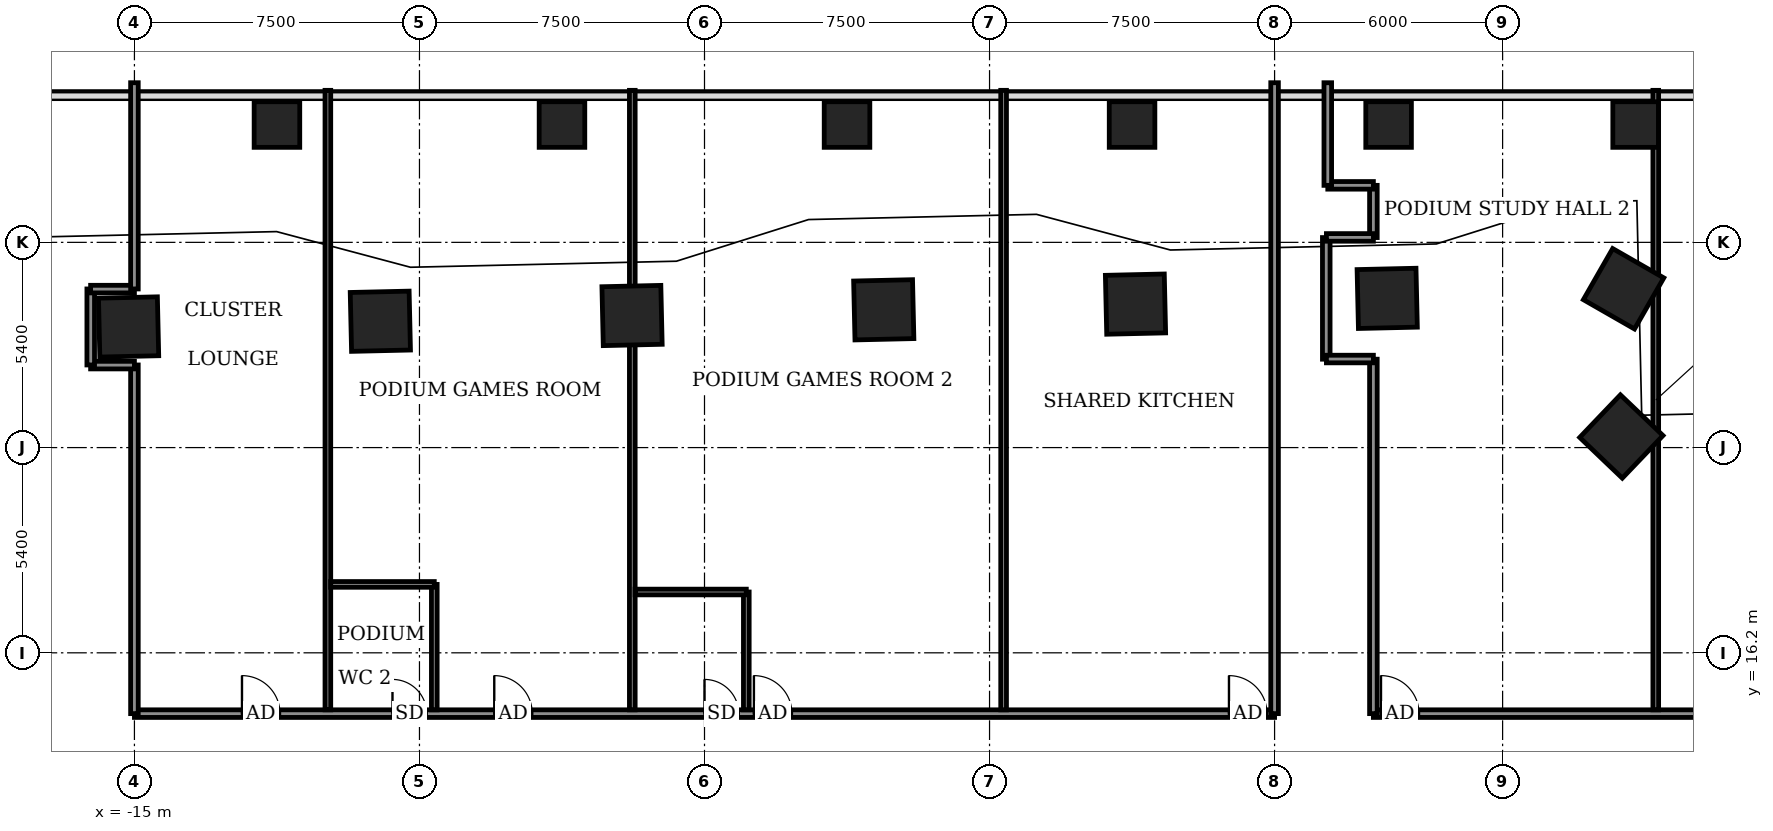
"""IFC4 building model, lengths in metres.
Left out: names, types, materials, properties, quantities, classifications, styles, units other than length and angle.
Written with IfcOpenShell. Run it as: python <this file> out.ifc"""

import sys

from ifc_helpers import new_model, si_unit, direction, frame, frame_2d, origin, origin_2d, place, context, subcontext, project, spatial, rectangle, extrude, element, fill, save


model = new_model("IFC4")
c1 = context("Model", 3, precision=1e-05, world=origin(), true_north=direction((0.0, 1.0)))
c2 = subcontext(c1, "Body", "Model", "MODEL_VIEW")
j1 = project(units=[si_unit("LENGTHUNIT", "METRE"), si_unit("PLANEANGLEUNIT", "RADIAN")], contexts=[c1])
p1 = place(None, origin())
s1 = spatial("IfcSite", under=j1, at=p1, CompositionType="ELEMENT")
p2 = place(p1, origin())
s2 = spatial("IfcBuilding", under=s1, at=p2, CompositionType="ELEMENT")
p3 = place(p2, frame((0.0, 0.0, 25.0)))
s3 = spatial("IfcBuildingStorey", under=s2, at=p3, CompositionType="ELEMENT", Elevation=25.0)
for number, where, z_axis, x_axis in (
    (1, (24.125, 21.892, -0.55), (0.0, 0.0, 1.0), (-0.723, 0.691, 0.0)),
    (2, (24.184, 25.779, -0.55), (0.0, 0.0, 1.0), (-0.868, 0.497, 0.0)),
    (3, (17.964, 25.526, -0.55), (0.0, 0.0, 1.0), (-1.0, -0.023, 0.0)),
    (4, (11.341, 25.375, -0.55), (0.0, 0.0, 1.0), (-1.0, -0.023, 0.0)),
    (5, (4.717, 25.225, -0.55), (0.0, 0.0, 1.0), (-1.0, -0.023, 0.0)),
    (6, (-1.906, 25.075, -0.55), (0.0, 0.0, 1.0), (-1.0, -0.023, 0.0)),
    (7, (-8.529, 24.924, -0.55), (0.0, 0.0, 1.0), (-1.0, -0.023, 0.0)),
    (8, (-15.154, 24.774, -0.55), (0.0, 0.0, 1.0), (-1.0, -0.023, 0.0)),
):
    element("IfcColumn", number, at=place(p3, frame(where, z_axis=z_axis, x_axis=x_axis)), inside=s3, PredefinedType="COLUMN", context=c2, shape_type="SweptSolid", body=[
        extrude(rectangle(XDim=1.55, YDim=1.55, at=origin_2d()), origin(), (0.0, 0.0, 1.0), 4.5),
    ])
for number, where, z_axis, x_axis in (
    (9, (-11.25, 30.1, -0.55), (0.0, 0.0, 1.0), (1.0, 0.0, 0.0)),
    (10, (-3.75, 30.1, -0.55), (0.0, 0.0, 1.0), (1.0, 0.0, 0.0)),
    (11, (3.75, 30.1, -0.55), (0.0, 0.0, 1.0), (1.0, 0.0, 0.0)),
    (12, (11.25, 30.1, -0.55), (0.0, 0.0, 1.0), (1.0, 0.0, 0.0)),
    (13, (18.0, 30.1, -0.55), (0.0, 0.0, 1.0), (1.0, 0.0, 0.0)),
    (14, (24.5, 30.1, -0.55), (0.0, 0.0, 1.0), (1.0, 0.0, 0.0)),
):
    element("IfcColumn", number, at=place(p3, frame(where, z_axis=z_axis, x_axis=x_axis)), inside=s3, PredefinedType="COLUMN", context=c2, shape_type="SweptSolid", body=[
        extrude(rectangle(XDim=1.2, YDim=1.2, at=origin_2d()), origin(), (0.0, 0.0, 1.0), 4.5),
    ])
p4 = place(p3, frame((-15.0, 14.6, 0.0), z_axis=(0.0, 0.0, 1.0), x_axis=(1.0, 0.0, 0.0)))
e15 = element("IfcWall", 15, at=p4, inside=s3, PredefinedType="PARTITIONING", context=c2, shape_type="SweptSolid", body=[
    extrude(rectangle(XDim=30.0, YDim=0.2, at=frame_2d((15.0, 0.0))), origin(), (0.0, 0.0, 1.0), 3.95),
])
p5 = place(p4, frame((2.83, 0.0, 0.0)))
e16 = element("IfcOpeningElement", 16, at=p5, cuts=e15, PredefinedType="OPENING", context=c2, shape_type="SweptSolid", body=[
    extrude(rectangle(XDim=1.0, YDim=2.1, at=frame_2d((0.5, 1.05))), frame((0.0, 0.11, 0.0), z_axis=(0.0, -1.0, 0.0), x_axis=(1.0, 0.0, 0.0)), (0.0, 0.0, 1.0), 0.22),
])
p6 = place(p4, frame((9.468, 0.0, 0.0)))
e17 = element("IfcOpeningElement", 17, at=p6, cuts=e15, PredefinedType="OPENING", context=c2, shape_type="SweptSolid", body=[
    extrude(rectangle(XDim=1.0, YDim=2.1, at=frame_2d((0.5, 1.05))), frame((0.0, 0.11, 0.0), z_axis=(0.0, -1.0, 0.0), x_axis=(1.0, 0.0, 0.0)), (0.0, 0.0, 1.0), 0.22),
])
p7 = place(p4, frame((6.79, 0.0, 0.0)))
e18 = element("IfcOpeningElement", 18, at=p7, cuts=e15, PredefinedType="OPENING", context=c2, shape_type="SweptSolid", body=[
    extrude(rectangle(XDim=0.9, YDim=2.1, at=frame_2d((0.45, 1.05))), frame((0.0, 0.11, 0.0), z_axis=(0.0, -1.0, 0.0), x_axis=(1.0, 0.0, 0.0)), (0.0, 0.0, 1.0), 0.22),
])
p8 = place(p4, frame((16.3, 0.0, 0.0)))
e19 = element("IfcOpeningElement", 19, at=p8, cuts=e15, PredefinedType="OPENING", context=c2, shape_type="SweptSolid", body=[
    extrude(rectangle(XDim=1.0, YDim=2.1, at=frame_2d((0.5, 1.05))), frame((0.0, 0.11, 0.0), z_axis=(0.0, -1.0, 0.0), x_axis=(1.0, 0.0, 0.0)), (0.0, 0.0, 1.0), 0.22),
])
p9 = place(p4, frame((15.0, 0.0, 0.0)))
e20 = element("IfcOpeningElement", 20, at=p9, cuts=e15, PredefinedType="OPENING", context=c2, shape_type="SweptSolid", body=[
    extrude(rectangle(XDim=0.9, YDim=2.1, at=frame_2d((0.45, 1.05))), frame((0.0, 0.11, 0.0), z_axis=(0.0, -1.0, 0.0), x_axis=(1.0, 0.0, 0.0)), (0.0, 0.0, 1.0), 0.22),
])
p10 = place(p4, frame((28.8, 0.0, 0.0)))
e21 = element("IfcOpeningElement", 21, at=p10, cuts=e15, PredefinedType="OPENING", context=c2, shape_type="SweptSolid", body=[
    extrude(rectangle(XDim=1.0, YDim=2.1, at=frame_2d((0.5, 1.05))), frame((0.0, 0.11, 0.0), z_axis=(0.0, -1.0, 0.0), x_axis=(1.0, 0.0, 0.0)), (0.0, 0.0, 1.0), 0.22),
])
p11 = place(p3, frame((-15.0, 14.6, 0.0), z_axis=(0.0, 0.0, 1.0), x_axis=(0.0, 1.0, 0.0)))
e22 = element("IfcWall", 22, at=p11, inside=s3, PredefinedType="PARTITIONING", context=c2, shape_type="SweptSolid", body=[
    extrude(rectangle(XDim=9.174, YDim=0.2, at=frame_2d((4.587, 0.0))), origin(), (0.0, 0.0, 1.0), 3.95),
])
p12 = place(p3, frame((-9.91, 14.7, 0.0), z_axis=(0.0, 0.0, 1.0), x_axis=(0.0, 1.0, 0.0)))
e23 = element("IfcWall", 23, at=p12, inside=s3, PredefinedType="PARTITIONING", context=c2, shape_type="SweptSolid", body=[
    extrude(rectangle(XDim=16.3, YDim=0.15, at=frame_2d((8.15, 0.0))), origin(), (0.0, 0.0, 1.0), 0.94),
])
p13 = place(p3, frame((-7.11, 14.7, 0.0), z_axis=(0.0, 0.0, 1.0), x_axis=(0.0, 1.0, 0.0)))
e24 = element("IfcWall", 24, at=p13, inside=s3, PredefinedType="PARTITIONING", context=c2, shape_type="SweptSolid", body=[
    extrude(rectangle(XDim=3.3, YDim=0.15, at=frame_2d((1.65, 0.0))), origin(), (0.0, 0.0, 1.0), 3.95),
])
p14 = place(p3, frame((-1.9, 14.7, 0.0), z_axis=(0.0, 0.0, 1.0), x_axis=(0.0, 1.0, 0.0)))
e25 = element("IfcWall", 25, at=p14, inside=s3, PredefinedType="PARTITIONING", context=c2, shape_type="SweptSolid", body=[
    extrude(rectangle(XDim=16.3, YDim=0.15, at=frame_2d((8.15, 0.0))), origin(), (0.0, 0.0, 1.0), 0.94),
])
p15 = place(p3, frame((1.1, 14.7, 0.0), z_axis=(0.0, 0.0, 1.0), x_axis=(0.0, 1.0, 0.0)))
e26 = element("IfcWall", 26, at=p15, inside=s3, PredefinedType="PARTITIONING", context=c2, shape_type="SweptSolid", body=[
    extrude(rectangle(XDim=3.1, YDim=0.15, at=frame_2d((1.55, 0.0))), origin(), (0.0, 0.0, 1.0), 3.95),
])
p16 = place(p3, frame((7.87, 14.7, 0.0), z_axis=(0.0, 0.0, 1.0), x_axis=(0.0, 1.0, 0.0)))
e27 = element("IfcWall", 27, at=p16, inside=s3, PredefinedType="PARTITIONING", context=c2, shape_type="SweptSolid", body=[
    extrude(rectangle(XDim=16.3, YDim=0.15, at=frame_2d((8.15, 0.0))), origin(), (0.0, 0.0, 1.0), 0.94),
])
p17 = place(p3, frame((15.0, 14.6, 0.0), z_axis=(0.0, 0.0, 1.0), x_axis=(0.0, 1.0, 0.0)))
e28 = element("IfcWall", 28, at=p17, inside=s3, PredefinedType="PARTITIONING", context=c2, shape_type="SweptSolid", body=[
    extrude(rectangle(XDim=16.6, YDim=0.2, at=frame_2d((8.3, 0.0))), origin(), (0.0, 0.0, 1.0), 0.94),
])
p18 = place(p3, frame((17.6, 14.6, 0.0), z_axis=(0.0, 0.0, 1.0), x_axis=(1.0, 0.0, 0.0)))
e29 = element("IfcWall", 29, at=p18, inside=s3, PredefinedType="PARTITIONING", context=c2, shape_type="SweptSolid", body=[
    extrude(rectangle(XDim=16.7, YDim=0.2, at=frame_2d((8.35, 0.0))), origin(), (0.0, 0.0, 1.0), 3.95),
])
p19 = place(p18, frame((13.209, 0.0, 0.0)))
e30 = element("IfcOpeningElement", 30, at=p19, cuts=e29, PredefinedType="OPENING", context=c2, shape_type="SweptSolid", body=[
    extrude(rectangle(XDim=1.0, YDim=2.1, at=frame_2d((0.5, 1.05))), frame((0.0, 0.11, 0.0), z_axis=(0.0, -1.0, 0.0), x_axis=(1.0, 0.0, 0.0)), (0.0, 0.0, 1.0), 0.22),
])
p20 = place(p18, frame((0.2, 0.0, 0.0)))
e31 = element("IfcOpeningElement", 31, at=p20, cuts=e29, PredefinedType="OPENING", context=c2, shape_type="SweptSolid", body=[
    extrude(rectangle(XDim=1.0, YDim=2.1, at=frame_2d((0.5, 1.05))), frame((0.0, 0.11, 0.0), z_axis=(0.0, -1.0, 0.0), x_axis=(1.0, 0.0, 0.0)), (0.0, 0.0, 1.0), 0.22),
])
p21 = place(p3, frame((17.6, 14.6, 0.0), z_axis=(0.0, 0.0, 1.0), x_axis=(0.0, 1.0, 0.0)))
e32 = element("IfcWall", 32, at=p21, inside=s3, PredefinedType="PARTITIONING", context=c2, shape_type="SweptSolid", body=[
    extrude(rectangle(XDim=9.326, YDim=0.2, at=frame_2d((4.663, 0.0))), origin(), (0.0, 0.0, 1.0), 3.95),
])
p22 = place(p3, frame((25.03, 14.7, 0.0), z_axis=(0.0, 0.0, 1.0), x_axis=(0.0, 1.0, 0.0)))
e33 = element("IfcWall", 33, at=p22, inside=s3, PredefinedType="PARTITIONING", context=c2, shape_type="SweptSolid", body=[
    extrude(rectangle(XDim=16.3, YDim=0.15, at=frame_2d((8.15, 0.0))), origin(), (0.0, 0.0, 1.0), 0.94),
])
p23 = place(p3, frame((-1.825, 17.8, 0.0), z_axis=(0.0, 0.0, 1.0), x_axis=(1.0, 0.0, 0.0)))
e34 = element("IfcWall", 34, at=p23, inside=s3, PredefinedType="PARTITIONING", context=c2, shape_type="SweptSolid", body=[
    extrude(rectangle(XDim=2.925, YDim=0.15, at=frame_2d((1.462, 0.0))), origin(), (0.0, 0.0, 1.0), 3.95),
])
p24 = place(p3, frame((-9.835, 18.0, 0.0), z_axis=(0.0, 0.0, 1.0), x_axis=(1.0, 0.0, 0.0)))
e35 = element("IfcWall", 35, at=p24, inside=s3, PredefinedType="PARTITIONING", context=c2, shape_type="SweptSolid", body=[
    extrude(rectangle(XDim=2.725, YDim=0.15, at=frame_2d((1.362, 0.0))), origin(), (0.0, 0.0, 1.0), 3.95),
])
p25 = place(p3, frame((-16.153, 23.77, 0.0), z_axis=(0.0, 0.0, 1.0), x_axis=(1.0, 0.0, 0.0)))
e36 = element("IfcWall", 36, at=p25, inside=s3, PredefinedType="PARTITIONING", context=c2, shape_type="SweptSolid", body=[
    extrude(rectangle(XDim=1.153, YDim=0.2, at=frame_2d((0.577, 0.0))), origin(), (0.0, 0.0, 1.0), 3.95),
])
p26 = place(p3, frame((-16.15, 23.774, 0.0), z_axis=(0.0, 0.0, 1.0), x_axis=(0.0, 1.0, 0.0)))
e37 = element("IfcWall", 37, at=p26, inside=s3, PredefinedType="PARTITIONING", context=c2, shape_type="SweptSolid", body=[
    extrude(rectangle(XDim=2.0, YDim=0.2, at=frame_2d((1.0, 0.0))), origin(), (0.0, 0.0, 1.0), 3.95),
])
p27 = place(p3, frame((16.36, 23.926, 0.0), z_axis=(0.0, 0.0, 1.0), x_axis=(0.0, 1.0, 0.0)))
e38 = element("IfcWall", 38, at=p27, inside=s3, PredefinedType="PARTITIONING", context=c2, shape_type="SweptSolid", body=[
    extrude(rectangle(XDim=3.2, YDim=0.2, at=frame_2d((1.6, 0.0))), origin(), (0.0, 0.0, 1.0), 3.95),
])
p28 = place(p3, frame((16.364, 23.93, 0.0), z_axis=(0.0, 0.0, 1.0), x_axis=(1.0, 0.0, 0.0)))
e39 = element("IfcWall", 39, at=p28, inside=s3, PredefinedType="PARTITIONING", context=c2, shape_type="SweptSolid", body=[
    extrude(rectangle(XDim=1.236, YDim=0.2, at=frame_2d((0.618, 0.0))), origin(), (0.0, 0.0, 1.0), 3.95),
])
p29 = place(p3, frame((-16.153, 25.77, 0.0), z_axis=(0.0, 0.0, 1.0), x_axis=(1.0, 0.0, 0.0)))
e40 = element("IfcWall", 40, at=p29, inside=s3, PredefinedType="PARTITIONING", context=c2, shape_type="SweptSolid", body=[
    extrude(rectangle(XDim=1.153, YDim=0.2, at=frame_2d((0.577, 0.0))), origin(), (0.0, 0.0, 1.0), 3.95),
])
p30 = place(p3, frame((-15.0, 25.774, 0.0), z_axis=(0.0, 0.0, 1.0), x_axis=(0.0, 1.0, 0.0)))
e41 = element("IfcWall", 41, at=p30, inside=s3, PredefinedType="PARTITIONING", context=c2, shape_type="SweptSolid", body=[
    extrude(rectangle(XDim=5.426, YDim=0.2, at=frame_2d((2.713, 0.0))), origin(), (0.0, 0.0, 1.0), 0.94),
])
p31 = place(p3, frame((17.6, 27.126, 0.0), z_axis=(0.0, 0.0, 1.0), x_axis=(0.0, 1.0, 0.0)))
e42 = element("IfcWall", 42, at=p31, inside=s3, PredefinedType="PARTITIONING", context=c2, shape_type="SweptSolid", body=[
    extrude(rectangle(XDim=1.374, YDim=0.2, at=frame_2d((0.687, 0.0))), origin(), (0.0, 0.0, 1.0), 3.95),
])
p32 = place(p3, frame((16.364, 27.13, 0.0), z_axis=(0.0, 0.0, 1.0), x_axis=(1.0, 0.0, 0.0)))
e43 = element("IfcWall", 43, at=p32, inside=s3, PredefinedType="PARTITIONING", context=c2, shape_type="SweptSolid", body=[
    extrude(rectangle(XDim=1.236, YDim=0.2, at=frame_2d((0.618, 0.0))), origin(), (0.0, 0.0, 1.0), 3.95),
])
p33 = place(p3, frame((16.4, 28.5, 0.0), z_axis=(0.0, 0.0, 1.0), x_axis=(1.0, 0.0, 0.0)))
e44 = element("IfcWall", 44, at=p33, inside=s3, PredefinedType="PARTITIONING", context=c2, shape_type="SweptSolid", body=[
    extrude(rectangle(XDim=1.2, YDim=0.2, at=frame_2d((0.6, 0.0))), origin(), (0.0, 0.0, 1.0), 3.95),
])
p34 = place(p3, frame((16.4, 28.5, 0.0), z_axis=(0.0, 0.0, 1.0), x_axis=(0.0, 1.0, 0.0)))
e45 = element("IfcWall", 45, at=p34, inside=s3, PredefinedType="PARTITIONING", context=c2, shape_type="SweptSolid", body=[
    extrude(rectangle(XDim=2.7, YDim=0.2, at=frame_2d((1.35, 0.0))), origin(), (0.0, 0.0, 1.0), 0.94),
])
p35 = place(p5, origin())
e46 = element("IfcDoor", 46, at=p35, inside=s3, OperationType="SINGLE_SWING_RIGHT", PredefinedType="DOOR", context=c2, shape_type="SweptSolid", body=[
    extrude(rectangle(XDim=1.0, YDim=2.1, at=frame_2d((0.5, 1.05))), frame((0.0, 0.025, 0.0), z_axis=(0.0, -1.0, 0.0), x_axis=(1.0, 0.0, 0.0)), (0.0, 0.0, 1.0), 0.05),
])
fill(e16, e46)
p36 = place(p6, origin())
e47 = element("IfcDoor", 47, at=p36, inside=s3, OperationType="SINGLE_SWING_LEFT", PredefinedType="DOOR", context=c2, shape_type="SweptSolid", body=[
    extrude(rectangle(XDim=1.0, YDim=2.1, at=frame_2d((0.5, 1.05))), frame((0.0, 0.025, 0.0), z_axis=(0.0, -1.0, 0.0), x_axis=(1.0, 0.0, 0.0)), (0.0, 0.0, 1.0), 0.05),
])
fill(e17, e47)
p37 = place(p7, origin())
e48 = element("IfcDoor", 48, at=p37, inside=s3, OperationType="SINGLE_SWING_LEFT", PredefinedType="DOOR", context=c2, shape_type="SweptSolid", body=[
    extrude(rectangle(XDim=0.9, YDim=2.1, at=frame_2d((0.45, 1.05))), frame((0.0, 0.025, 0.0), z_axis=(0.0, -1.0, 0.0), x_axis=(1.0, 0.0, 0.0)), (0.0, 0.0, 1.0), 0.05),
])
fill(e18, e48)
p38 = place(p8, origin())
e49 = element("IfcDoor", 49, at=p38, inside=s3, OperationType="SINGLE_SWING_RIGHT", PredefinedType="DOOR", context=c2, shape_type="SweptSolid", body=[
    extrude(rectangle(XDim=1.0, YDim=2.1, at=frame_2d((0.5, 1.05))), frame((0.0, 0.025, 0.0), z_axis=(0.0, -1.0, 0.0), x_axis=(1.0, 0.0, 0.0)), (0.0, 0.0, 1.0), 0.05),
])
fill(e19, e49)
p39 = place(p9, origin())
e50 = element("IfcDoor", 50, at=p39, inside=s3, OperationType="SINGLE_SWING_RIGHT", PredefinedType="DOOR", context=c2, shape_type="SweptSolid", body=[
    extrude(rectangle(XDim=0.9, YDim=2.1, at=frame_2d((0.45, 1.05))), frame((0.0, 0.025, 0.0), z_axis=(0.0, -1.0, 0.0), x_axis=(1.0, 0.0, 0.0)), (0.0, 0.0, 1.0), 0.05),
])
fill(e20, e50)
p40 = place(p10, origin())
e51 = element("IfcDoor", 51, at=p40, inside=s3, OperationType="SINGLE_SWING_LEFT", PredefinedType="DOOR", context=c2, shape_type="SweptSolid", body=[
    extrude(rectangle(XDim=1.0, YDim=2.1, at=frame_2d((0.5, 1.05))), frame((0.0, 0.025, 0.0), z_axis=(0.0, -1.0, 0.0), x_axis=(1.0, 0.0, 0.0)), (0.0, 0.0, 1.0), 0.05),
])
fill(e21, e51)
p41 = place(p20, origin())
e52 = element("IfcDoor", 52, at=p41, inside=s3, OperationType="SINGLE_SWING_RIGHT", PredefinedType="DOOR", context=c2, shape_type="SweptSolid", body=[
    extrude(rectangle(XDim=1.0, YDim=2.1, at=frame_2d((0.5, 1.05))), frame((0.0, 0.025, 0.0), z_axis=(0.0, -1.0, 0.0), x_axis=(1.0, 0.0, 0.0)), (0.0, 0.0, 1.0), 0.05),
])
fill(e31, e52)
save(model, sys.argv[1])
